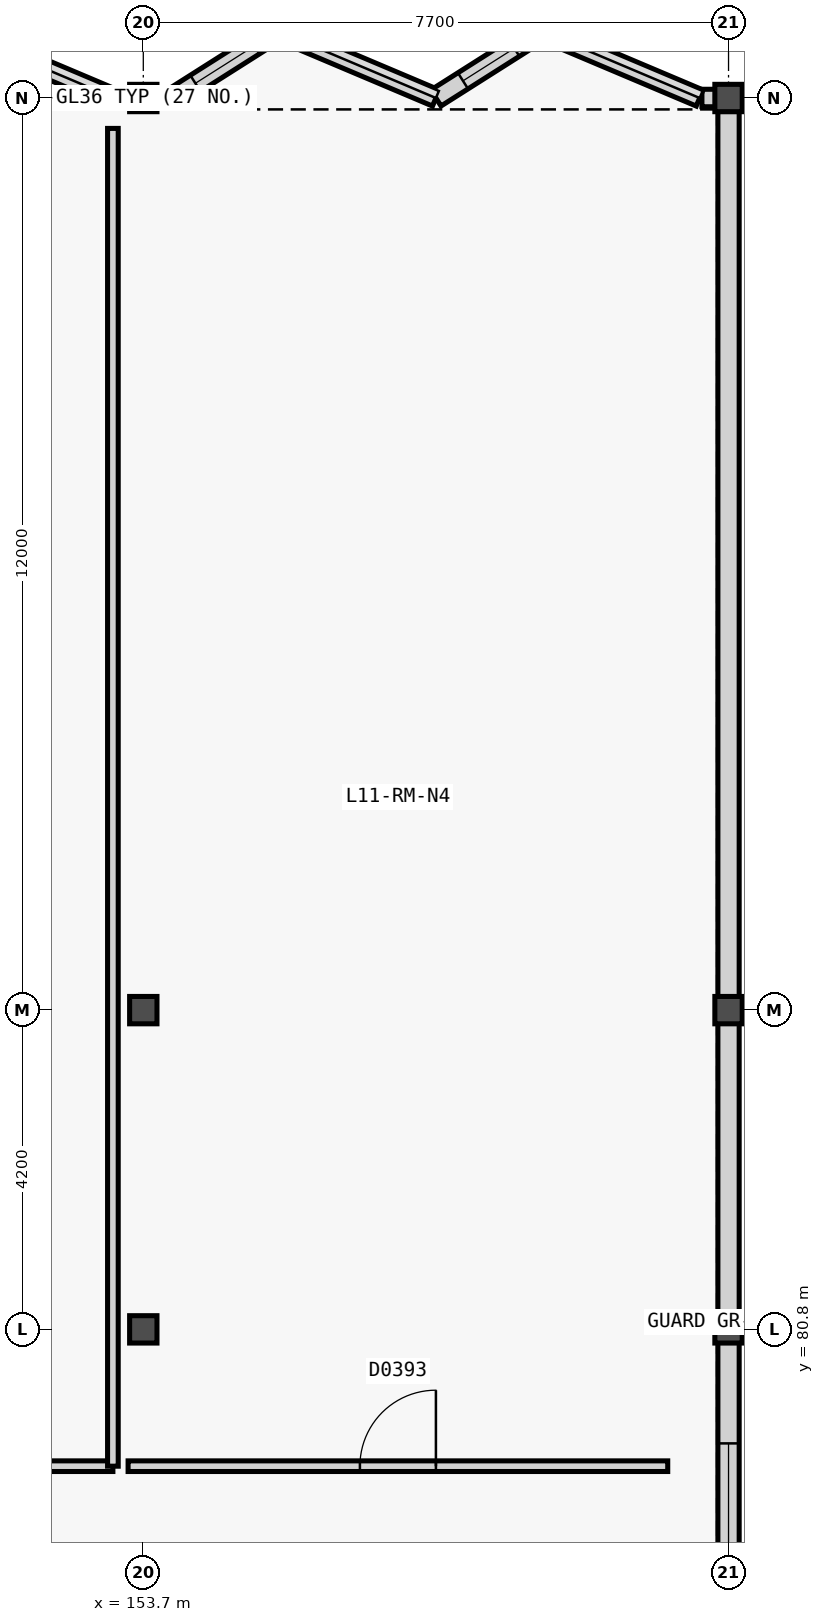
"""IFC4 building model, lengths in metres.
Left out: names, types, materials, properties, quantities, classifications, styles, units other than length and angle.
Written with IfcOpenShell. Run it as: python <this file> out.ifc"""

import sys

from ifc_helpers import new_model, si_unit, direction, frame, frame_2d, origin, origin_2d, place, context, subcontext, project, spatial, rectangle, extrude, element, fill, save


model = new_model("IFC4")
c1 = context("Model", 3, precision=1e-05, world=origin(), true_north=direction((0.0, 1.0)))
c2 = subcontext(c1, "Body", "Model", "MODEL_VIEW")
j1 = project(units=[si_unit("LENGTHUNIT", "METRE"), si_unit("PLANEANGLEUNIT", "RADIAN")], contexts=[c1])
p1 = place(None, origin())
s1 = spatial("IfcSite", under=j1, at=p1, CompositionType="ELEMENT")
p2 = place(p1, origin())
s2 = spatial("IfcBuilding", under=s1, at=p2, CompositionType="ELEMENT")
p3 = place(p2, frame((0.0, 0.0, 43.2)))
s3 = spatial("IfcBuildingStorey", under=s2, at=p3, CompositionType="ELEMENT", Elevation=43.2)
for number, where, z_axis, x_axis in (
    (1, (153.7, 80.8, 0.0), (0.0, 0.0, 1.0), (1.0, 0.0, 0.0)),
    (2, (153.7, 85.0, 0.0), (0.0, 0.0, 1.0), (1.0, 0.0, 0.0)),
    (3, (153.7, 97.0, 0.0), (0.0, 0.0, 1.0), (1.0, 0.0, 0.0)),
    (4, (161.4, 80.8, 0.0), (0.0, 0.0, 1.0), (1.0, 0.0, 0.0)),
    (5, (161.4, 85.0, 0.0), (0.0, 0.0, 1.0), (1.0, 0.0, 0.0)),
    (6, (161.4, 97.0, 0.0), (0.0, 0.0, 1.0), (1.0, 0.0, 0.0)),
):
    element("IfcColumn", number, at=place(p3, frame(where, z_axis=z_axis, x_axis=x_axis)), inside=s3, PredefinedType="COLUMN", context=c2, shape_type="SweptSolid", body=[
        extrude(rectangle(XDim=0.36, YDim=0.36, at=origin_2d()), origin(), (0.0, 0.0, 1.0), 3.66),
    ])
p4 = place(p3, frame((161.4, 96.822, 0.0), z_axis=(0.0, 0.0, 1.0), x_axis=(0.0, -1.0, 0.0)))
e7 = element("IfcWall", 7, at=p4, inside=s3, PredefinedType="SOLIDWALL", context=c2, shape_type="SweptSolid", body=[
    extrude(rectangle(XDim=32.644, YDim=0.28, at=frame_2d((16.322, 0.0))), origin(), (0.0, 0.0, 1.0), 3.06),
])
p5 = place(p4, frame((17.522, 0.0, 0.82)))
e8 = element("IfcOpeningElement", 8, at=p5, cuts=e7, PredefinedType="OPENING", context=c2, shape_type="SweptSolid", body=[
    extrude(rectangle(XDim=3.9, YDim=1.45, at=frame_2d((1.95, 0.725))), frame((0.0, 0.15, 0.0), z_axis=(0.0, -1.0, 0.0), x_axis=(1.0, 0.0, 0.0)), (0.0, 0.0, 1.0), 0.3),
])
p6 = place(p3, frame((153.35, 97.0, 0.0), z_axis=(0.0, 0.0, 1.0), x_axis=(1.0, 0.0, 0.0)))
e9 = element("IfcWall", 9, at=p6, inside=s3, PredefinedType="SOLIDWALL", context=c2, shape_type="SweptSolid", body=[
    extrude(rectangle(XDim=0.35, YDim=0.23, at=frame_2d((0.175, 0.0))), origin(), (0.0, 0.0, 1.0), 3.66),
])
p7 = place(p3, frame((153.7, 97.0, 0.0), z_axis=(0.0, 0.0, 1.0), x_axis=(1.0, 0.0, 0.0)))
e10 = element("IfcWall", 10, at=p7, inside=s3, PredefinedType="SOLIDWALL", context=c2, shape_type="SweptSolid", body=[
    extrude(rectangle(XDim=0.35, YDim=0.23, at=frame_2d((0.175, 0.0))), origin(), (0.0, 0.0, 1.0), 3.66),
])
p8 = place(p3, frame((161.05, 97.0, 0.0), z_axis=(0.0, 0.0, 1.0), x_axis=(1.0, 0.0, 0.0)))
e11 = element("IfcWall", 11, at=p8, inside=s3, PredefinedType="SOLIDWALL", context=c2, shape_type="SweptSolid", body=[
    extrude(rectangle(XDim=0.35, YDim=0.23, at=frame_2d((0.175, 0.0))), origin(), (0.0, 0.0, 1.0), 3.66),
])
p9 = place(p3, frame((151.238, 97.88, 0.0), z_axis=(0.0, 0.0, 1.0), x_axis=(0.921122216024, -0.389273506866, 0.0)))
e12 = element("IfcWall", 12, at=p9, inside=s3, PredefinedType="SOLIDWALL", context=c2, shape_type="SweptSolid", body=[
    extrude(rectangle(XDim=2.26, YDim=0.23, at=frame_2d((1.13, 0.0))), origin(), (0.0, 0.0, 1.0), 3.66),
])
p10 = place(p3, frame((154.08, 97.0, 0.0), z_axis=(0.0, 0.0, 1.0), x_axis=(0.844583954912, 0.535423143976, 0.0)))
e13 = element("IfcWall", 13, at=p10, inside=s3, PredefinedType="SOLIDWALL", context=c2, shape_type="SweptSolid", body=[
    extrude(rectangle(XDim=1.643, YDim=0.25, at=frame_2d((0.822, 0.0))), origin(), (0.0, 0.0, 1.0), 3.66),
])
p11 = place(p10, frame((0.362, 0.0, 0.82)))
e14 = element("IfcOpeningElement", 14, at=p11, cuts=e13, PredefinedType="OPENING", context=c2, shape_type="SweptSolid", body=[
    extrude(rectangle(XDim=0.92, YDim=1.38, at=frame_2d((0.46, 0.69))), frame((0.0, 0.135, 0.0), z_axis=(0.0, -1.0, 0.0), x_axis=(1.0, 0.0, 0.0)), (0.0, 0.0, 1.0), 0.27),
])
p12 = place(p3, frame((155.468, 97.88, 0.0), z_axis=(0.0, 0.0, 1.0), x_axis=(0.921122216024, -0.389273506866, 0.0)))
e15 = element("IfcWall", 15, at=p12, inside=s3, PredefinedType="SOLIDWALL", context=c2, shape_type="SweptSolid", body=[
    extrude(rectangle(XDim=2.26, YDim=0.23, at=frame_2d((1.13, 0.0))), origin(), (0.0, 0.0, 1.0), 3.66),
])
p13 = place(p3, frame((157.55, 97.0, 0.0), z_axis=(0.0, 0.0, 1.0), x_axis=(0.844583954912, 0.535423143976, 0.0)))
e16 = element("IfcWall", 16, at=p13, inside=s3, PredefinedType="SOLIDWALL", context=c2, shape_type="SweptSolid", body=[
    extrude(rectangle(XDim=1.643, YDim=0.25, at=frame_2d((0.822, 0.0))), origin(), (0.0, 0.0, 1.0), 3.66),
])
p14 = place(p13, frame((0.422, 0.0, 0.82)))
e17 = element("IfcOpeningElement", 17, at=p14, cuts=e16, PredefinedType="OPENING", context=c2, shape_type="SweptSolid", body=[
    extrude(rectangle(XDim=0.8, YDim=1.35, at=frame_2d((0.4, 0.675))), frame((0.0, 0.135, 0.0), z_axis=(0.0, -1.0, 0.0), x_axis=(1.0, 0.0, 0.0)), (0.0, 0.0, 1.0), 0.27),
])
p15 = place(p3, frame((158.938, 97.88, 0.0), z_axis=(0.0, 0.0, 1.0), x_axis=(0.921122216024, -0.389273506866, 0.0)))
e18 = element("IfcWall", 18, at=p15, inside=s3, PredefinedType="SOLIDWALL", context=c2, shape_type="SweptSolid", body=[
    extrude(rectangle(XDim=2.26, YDim=0.23, at=frame_2d((1.13, 0.0))), origin(), (0.0, 0.0, 1.0), 3.66),
])
p16 = place(p3, frame((144.5, 79.0, 0.0), z_axis=(0.0, 0.0, 1.0), x_axis=(1.0, 0.0, 0.0)))
e19 = element("IfcWall", 19, at=p16, inside=s3, PredefinedType="PARTITIONING", context=c2, shape_type="SweptSolid", body=[
    extrude(rectangle(XDim=8.8, YDim=0.14, at=frame_2d((4.4, 0.0))), origin(), (0.0, 0.0, 1.0), 3.64),
])
p17 = place(p16, frame((3.925, 0.0, 0.0)))
e20 = element("IfcOpeningElement", 20, at=p17, cuts=e19, PredefinedType="OPENING", context=c2, shape_type="SweptSolid", body=[
    extrude(rectangle(XDim=0.95, YDim=2.1, at=frame_2d((0.475, 1.05))), frame((0.0, 0.08, 0.0), z_axis=(0.0, -1.0, 0.0), x_axis=(1.0, 0.0, 0.0)), (0.0, 0.0, 1.0), 0.16),
])
p18 = place(p3, frame((153.3, 79.0, 0.0), z_axis=(0.0, 0.0, 1.0), x_axis=(0.0, 1.0, 0.0)))
e21 = element("IfcWall", 21, at=p18, inside=s3, PredefinedType="PARTITIONING", context=c2, shape_type="SweptSolid", body=[
    extrude(rectangle(XDim=17.6, YDim=0.14, at=frame_2d((8.8, 0.0))), origin(), (0.0, 0.0, 1.0), 3.64),
])
p19 = place(p3, frame((153.5, 79.0, 0.0), z_axis=(0.0, 0.0, 1.0), x_axis=(1.0, 0.0, 0.0)))
e22 = element("IfcWall", 22, at=p19, inside=s3, PredefinedType="PARTITIONING", context=c2, shape_type="SweptSolid", body=[
    extrude(rectangle(XDim=7.1, YDim=0.14, at=frame_2d((3.55, 0.0))), origin(), (0.0, 0.0, 1.0), 3.64),
])
p20 = place(p19, frame((3.05, 0.0, 0.0)))
e23 = element("IfcOpeningElement", 23, at=p20, cuts=e22, PredefinedType="OPENING", context=c2, shape_type="SweptSolid", body=[
    extrude(rectangle(XDim=1.0, YDim=2.15, at=frame_2d((0.5, 1.075))), frame((0.0, 0.08, 0.0), z_axis=(0.0, -1.0, 0.0), x_axis=(1.0, 0.0, 0.0)), (0.0, 0.0, 1.0), 0.16),
])
p21 = place(p5, origin())
e24 = element("IfcWindow", 24, at=p21, inside=s3, PartitioningType="SINGLE_PANEL", PredefinedType="WINDOW", context=c2, shape_type="SweptSolid", body=[
    extrude(rectangle(XDim=3.9, YDim=1.45, at=frame_2d((1.95, 0.725))), frame((0.0, 0.03, 0.0), z_axis=(0.0, -1.0, 0.0), x_axis=(1.0, 0.0, 0.0)), (0.0, 0.0, 1.0), 0.06),
])
fill(e8, e24)
p22 = place(p11, origin())
e25 = element("IfcWindow", 25, at=p22, inside=s3, PartitioningType="SINGLE_PANEL", PredefinedType="WINDOW", context=c2, shape_type="SweptSolid", body=[
    extrude(rectangle(XDim=0.92, YDim=1.38, at=frame_2d((0.46, 0.69))), frame((0.0, 0.03, 0.0), z_axis=(0.0, -1.0, 0.0), x_axis=(1.0, 0.0, 0.0)), (0.0, 0.0, 1.0), 0.06),
])
fill(e14, e25)
p23 = place(p14, origin())
e26 = element("IfcWindow", 26, at=p23, inside=s3, PartitioningType="SINGLE_PANEL", PredefinedType="WINDOW", context=c2, shape_type="SweptSolid", body=[
    extrude(rectangle(XDim=0.8, YDim=1.35, at=frame_2d((0.4, 0.675))), frame((0.0, 0.03, 0.0), z_axis=(0.0, -1.0, 0.0), x_axis=(1.0, 0.0, 0.0)), (0.0, 0.0, 1.0), 0.06),
])
fill(e17, e26)
p24 = place(p20, origin())
e27 = element("IfcDoor", 27, at=p24, inside=s3, OperationType="SINGLE_SWING_RIGHT", PredefinedType="DOOR", context=c2, shape_type="SweptSolid", body=[
    extrude(rectangle(XDim=1.0, YDim=2.15, at=frame_2d((0.5, 1.075))), frame((0.0, 0.025, 0.0), z_axis=(0.0, -1.0, 0.0), x_axis=(1.0, 0.0, 0.0)), (0.0, 0.0, 1.0), 0.05),
])
fill(e23, e27)
save(model, sys.argv[1])
